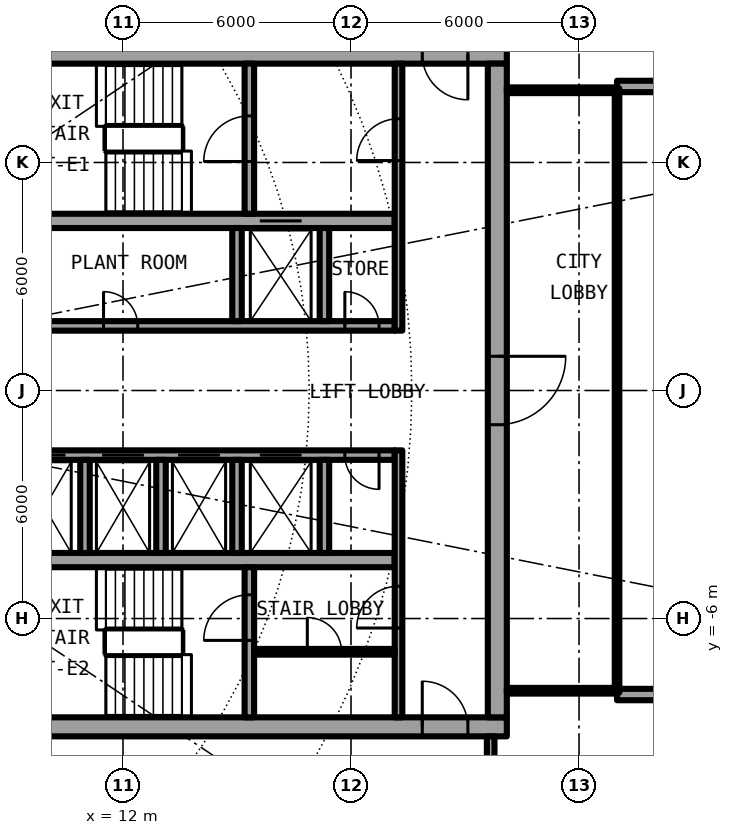
"""IFC4 building model, lengths in metres.
Left out: names, types, materials, properties, quantities, classifications, styles, units other than length and angle.
Written with IfcOpenShell. Run it as: python <this file> out.ifc"""

import sys

from ifc_helpers import new_model, si_unit, direction, frame, frame_2d, origin, place, context, subcontext, project, spatial, rectangle, extrude, element, fill, save


model = new_model("IFC4")
c1 = context("Model", 3, precision=1e-05, world=origin(), true_north=direction((0.0, 1.0)))
c2 = subcontext(c1, "Body", "Model", "MODEL_VIEW")
j1 = project(units=[si_unit("LENGTHUNIT", "METRE"), si_unit("PLANEANGLEUNIT", "RADIAN")], contexts=[c1])
p1 = place(None, origin())
s1 = spatial("IfcSite", under=j1, at=p1, CompositionType="ELEMENT")
p2 = place(p1, origin())
s2 = spatial("IfcBuilding", under=s1, at=p2, CompositionType="ELEMENT")
p3 = place(p2, frame((0.0, 0.0, 151.3)))
s3 = spatial("IfcBuildingStorey", under=s2, at=p3, CompositionType="ELEMENT", Elevation=151.3)
for number, where, z_axis, x_axis in (
    (1, (25.0, 8.0, 0.0), (0.0, 0.0, 1.0), (1.0, 0.0, 0.0)),
    (2, (25.0, -8.0, 0.0), (0.0, 0.0, 1.0), (1.0, 0.0, 0.0)),
):
    element("IfcWall", number, at=place(p3, frame(where, z_axis=z_axis, x_axis=x_axis)), inside=s3, PredefinedType="SOLIDWALL", context=c2, shape_type="SweptSolid", body=[
        extrude(rectangle(XDim=2.667, YDim=0.3, at=frame_2d((1.333, 0.0))), origin(), (0.0, 0.0, 1.0), 2.7),
    ])
p4 = place(p3, frame((22.1, 8.85, 0.0), z_axis=(0.0, 0.0, 1.0), x_axis=(-1.0, 0.0, 0.0)))
e3 = element("IfcWall", 3, at=p4, inside=s3, PredefinedType="SHEAR", context=c2, shape_type="SweptSolid", body=[
    extrude(rectangle(XDim=13.6, YDim=0.5, at=frame_2d((6.8, 0.0))), origin(), (0.0, 0.0, 1.0), 3.05),
])
p5 = place(p4, frame((1.025, 0.0, 0.0)))
e4 = element("IfcOpeningElement", 4, at=p5, cuts=e3, PredefinedType="OPENING", context=c2, shape_type="SweptSolid", body=[
    extrude(rectangle(XDim=1.2, YDim=2.3, at=frame_2d((0.6, 1.15))), frame((0.0, 0.26, 0.0), z_axis=(0.0, -1.0, 0.0), x_axis=(1.0, 0.0, 0.0)), (0.0, 0.0, 1.0), 0.52),
])
p6 = place(p3, frame((8.5, -8.85, 0.0), z_axis=(0.0, 0.0, 1.0), x_axis=(1.0, 0.0, 0.0)))
e5 = element("IfcWall", 5, at=p6, inside=s3, PredefinedType="SHEAR", context=c2, shape_type="SweptSolid", body=[
    extrude(rectangle(XDim=13.6, YDim=0.5, at=frame_2d((6.8, 0.0))), origin(), (0.0, 0.0, 1.0), 3.05),
])
p7 = place(p6, frame((11.375, 0.0, 0.0)))
e6 = element("IfcOpeningElement", 6, at=p7, cuts=e5, PredefinedType="OPENING", context=c2, shape_type="SweptSolid", body=[
    extrude(rectangle(XDim=1.2, YDim=2.3, at=frame_2d((0.6, 1.15))), frame((0.0, 0.26, 0.0), z_axis=(0.0, -1.0, 0.0), x_axis=(1.0, 0.0, 0.0)), (0.0, 0.0, 1.0), 0.52),
])
p8 = place(p3, frame((21.85, 8.6, 0.0), z_axis=(0.0, 0.0, 1.0), x_axis=(0.0, -1.0, 0.0)))
e7 = element("IfcWall", 7, at=p8, inside=s3, PredefinedType="SHEAR", context=c2, shape_type="SweptSolid", body=[
    extrude(rectangle(XDim=17.2, YDim=0.5, at=frame_2d((8.6, 0.0))), origin(), (0.0, 0.0, 1.0), 3.05),
])
p9 = place(p8, frame((7.7, 0.0, 0.0)))
e8 = element("IfcOpeningElement", 8, at=p9, cuts=e7, PredefinedType="OPENING", context=c2, shape_type="SweptSolid", body=[
    extrude(rectangle(XDim=1.8, YDim=2.3, at=frame_2d((0.9, 1.15))), frame((0.0, 0.26, 0.0), z_axis=(0.0, -1.0, 0.0), x_axis=(1.0, 0.0, 0.0)), (0.0, 0.0, 1.0), 0.52),
])
p10 = place(p3, frame((9.0, 1.7, 0.0), z_axis=(0.0, 0.0, 1.0), x_axis=(1.0, 0.0, 0.0)))
e9 = element("IfcWall", 9, at=p10, inside=s3, PredefinedType="SHEAR", context=c2, shape_type="SweptSolid", body=[
    extrude(rectangle(XDim=10.15, YDim=0.25, at=frame_2d((5.075, 0.0))), origin(), (0.0, 0.0, 1.0), 3.05),
])
p11 = place(p10, frame((2.488, 0.0, 0.0)))
e10 = element("IfcOpeningElement", 10, at=p11, cuts=e9, PredefinedType="OPENING", context=c2, shape_type="SweptSolid", body=[
    extrude(rectangle(XDim=0.9, YDim=2.3, at=frame_2d((0.45, 1.15))), frame((0.0, 0.135, 0.0), z_axis=(0.0, -1.0, 0.0), x_axis=(1.0, 0.0, 0.0)), (0.0, 0.0, 1.0), 0.27),
])
p12 = place(p10, frame((8.837, 0.0, 0.0)))
e11 = element("IfcOpeningElement", 11, at=p12, cuts=e9, PredefinedType="OPENING", context=c2, shape_type="SweptSolid", body=[
    extrude(rectangle(XDim=0.9, YDim=2.3, at=frame_2d((0.45, 1.15))), frame((0.0, 0.135, 0.0), z_axis=(0.0, -1.0, 0.0), x_axis=(1.0, 0.0, 0.0)), (0.0, 0.0, 1.0), 0.27),
])
p13 = place(p3, frame((9.0, 4.462, 0.0), z_axis=(0.0, 0.0, 1.0), x_axis=(1.0, 0.0, 0.0)))
e12 = element("IfcWall", 12, at=p13, inside=s3, PredefinedType="SHEAR", context=c2, shape_type="SweptSolid", body=[
    extrude(rectangle(XDim=10.15, YDim=0.375, at=frame_2d((5.075, 0.0))), origin(), (0.0, 0.0, 1.0), 3.05),
])
p14 = place(p13, frame((6.6, 0.0, 0.0)))
e13 = element("IfcOpeningElement", 13, at=p14, cuts=e12, PredefinedType="OPENING", context=c2, shape_type="SweptSolid", body=[
    extrude(rectangle(XDim=1.1, YDim=2.3, at=frame_2d((0.55, 1.15))), frame((0.0, 0.198, 0.0), z_axis=(0.0, -1.0, 0.0), x_axis=(1.0, 0.0, 0.0)), (0.0, 0.0, 1.0), 0.395),
])
p15 = place(p3, frame((15.325, 4.65, 0.0), z_axis=(0.0, 0.0, 1.0), x_axis=(0.0, 1.0, 0.0)))
e14 = element("IfcWall", 14, at=p15, inside=s3, PredefinedType="SHEAR", context=c2, shape_type="SweptSolid", body=[
    extrude(rectangle(XDim=3.95, YDim=0.25, at=frame_2d((1.975, 0.0))), origin(), (0.0, 0.0, 1.0), 3.05),
])
p16 = place(p15, frame((1.375, 0.0, 0.0)))
e15 = element("IfcOpeningElement", 15, at=p16, cuts=e14, PredefinedType="OPENING", context=c2, shape_type="SweptSolid", body=[
    extrude(rectangle(XDim=1.2, YDim=2.3, at=frame_2d((0.6, 1.15))), frame((0.0, 0.135, 0.0), z_axis=(0.0, -1.0, 0.0), x_axis=(1.0, 0.0, 0.0)), (0.0, 0.0, 1.0), 0.27),
])
for number, where, z_axis, x_axis in (
    (16, (15.0, 1.825, 0.0), (0.0, 0.0, 1.0), (0.0, 1.0, 0.0)),
    (17, (17.3, 1.825, 0.0), (0.0, 0.0, 1.0), (0.0, 1.0, 0.0)),
):
    element("IfcWall", number, at=place(p3, frame(where, z_axis=z_axis, x_axis=x_axis)), inside=s3, PredefinedType="SOLIDWALL", context=c2, shape_type="SweptSolid", body=[
        extrude(rectangle(XDim=2.45, YDim=0.25, at=frame_2d((1.225, 0.0))), origin(), (0.0, 0.0, 1.0), 2.7),
    ])
p17 = place(p3, frame((19.25, 1.575, 0.0), z_axis=(0.0, 0.0, 1.0), x_axis=(0.0, 1.0, 0.0)))
e18 = element("IfcWall", 18, at=p17, inside=s3, PredefinedType="SOLIDWALL", context=c2, shape_type="SweptSolid", body=[
    extrude(rectangle(XDim=7.025, YDim=0.2, at=frame_2d((3.513, 0.0))), origin(), (0.0, 0.0, 1.0), 2.7),
])
p18 = place(p17, frame((4.475, 0.0, 0.0)))
e19 = element("IfcOpeningElement", 19, at=p18, cuts=e18, PredefinedType="OPENING", context=c2, shape_type="SweptSolid", body=[
    extrude(rectangle(XDim=1.1, YDim=2.3, at=frame_2d((0.55, 1.15))), frame((0.0, 0.11, 0.0), z_axis=(0.0, -1.0, 0.0), x_axis=(1.0, 0.0, 0.0)), (0.0, 0.0, 1.0), 0.22),
])
p19 = place(p3, frame((19.15, -1.7, 0.0), z_axis=(0.0, 0.0, 1.0), x_axis=(-1.0, 0.0, 0.0)))
e20 = element("IfcWall", 20, at=p19, inside=s3, PredefinedType="SHEAR", context=c2, shape_type="SweptSolid", body=[
    extrude(rectangle(XDim=10.15, YDim=0.25, at=frame_2d((5.075, 0.0))), origin(), (0.0, 0.0, 1.0), 3.05),
])
p20 = place(p19, frame((8.663, 0.0, 0.0)))
e21 = element("IfcOpeningElement", 21, at=p20, cuts=e20, PredefinedType="OPENING", context=c2, shape_type="SweptSolid", body=[
    extrude(rectangle(XDim=1.1, YDim=2.3, at=frame_2d((0.55, 1.15))), frame((0.0, 0.135, 0.0), z_axis=(0.0, -1.0, 0.0), x_axis=(1.0, 0.0, 0.0)), (0.0, 0.0, 1.0), 0.27),
])
p21 = place(p19, frame((6.6, 0.0, 0.0)))
e22 = element("IfcOpeningElement", 22, at=p21, cuts=e20, PredefinedType="OPENING", context=c2, shape_type="SweptSolid", body=[
    extrude(rectangle(XDim=1.1, YDim=2.3, at=frame_2d((0.55, 1.15))), frame((0.0, 0.135, 0.0), z_axis=(0.0, -1.0, 0.0), x_axis=(1.0, 0.0, 0.0)), (0.0, 0.0, 1.0), 0.27),
])
p22 = place(p19, frame((4.6, 0.0, 0.0)))
e23 = element("IfcOpeningElement", 23, at=p22, cuts=e20, PredefinedType="OPENING", context=c2, shape_type="SweptSolid", body=[
    extrude(rectangle(XDim=1.1, YDim=2.3, at=frame_2d((0.55, 1.15))), frame((0.0, 0.135, 0.0), z_axis=(0.0, -1.0, 0.0), x_axis=(1.0, 0.0, 0.0)), (0.0, 0.0, 1.0), 0.27),
])
p23 = place(p19, frame((2.45, 0.0, 0.0)))
e24 = element("IfcOpeningElement", 24, at=p23, cuts=e20, PredefinedType="OPENING", context=c2, shape_type="SweptSolid", body=[
    extrude(rectangle(XDim=1.1, YDim=2.3, at=frame_2d((0.55, 1.15))), frame((0.0, 0.135, 0.0), z_axis=(0.0, -1.0, 0.0), x_axis=(1.0, 0.0, 0.0)), (0.0, 0.0, 1.0), 0.27),
])
p24 = place(p19, frame((0.413, 0.0, 0.0)))
e25 = element("IfcOpeningElement", 25, at=p24, cuts=e20, PredefinedType="OPENING", context=c2, shape_type="SweptSolid", body=[
    extrude(rectangle(XDim=0.9, YDim=2.3, at=frame_2d((0.45, 1.15))), frame((0.0, 0.135, 0.0), z_axis=(0.0, -1.0, 0.0), x_axis=(1.0, 0.0, 0.0)), (0.0, 0.0, 1.0), 0.27),
])
p25 = place(p3, frame((9.0, -4.462, 0.0), z_axis=(0.0, 0.0, 1.0), x_axis=(1.0, 0.0, 0.0)))
e26 = element("IfcWall", 26, at=p25, inside=s3, PredefinedType="SHEAR", context=c2, shape_type="SweptSolid", body=[
    extrude(rectangle(XDim=10.15, YDim=0.375, at=frame_2d((5.075, 0.0))), origin(), (0.0, 0.0, 1.0), 3.05),
])
p26 = place(p3, frame((15.325, -8.6, 0.0), z_axis=(0.0, 0.0, 1.0), x_axis=(0.0, 1.0, 0.0)))
e27 = element("IfcWall", 27, at=p26, inside=s3, PredefinedType="SHEAR", context=c2, shape_type="SweptSolid", body=[
    extrude(rectangle(XDim=3.95, YDim=0.25, at=frame_2d((1.975, 0.0))), origin(), (0.0, 0.0, 1.0), 3.05),
])
p27 = place(p26, frame((2.025, 0.0, 0.0)))
e28 = element("IfcOpeningElement", 28, at=p27, cuts=e27, PredefinedType="OPENING", context=c2, shape_type="SweptSolid", body=[
    extrude(rectangle(XDim=1.2, YDim=2.3, at=frame_2d((0.6, 1.15))), frame((0.0, 0.135, 0.0), z_axis=(0.0, -1.0, 0.0), x_axis=(1.0, 0.0, 0.0)), (0.0, 0.0, 1.0), 0.27),
])
for number, where, z_axis, x_axis in (
    (29, (15.0, -1.825, 0.0), (0.0, 0.0, 1.0), (0.0, -1.0, 0.0)),
    (30, (17.3, -1.825, 0.0), (0.0, 0.0, 1.0), (0.0, -1.0, 0.0)),
):
    element("IfcWall", number, at=place(p3, frame(where, z_axis=z_axis, x_axis=x_axis)), inside=s3, PredefinedType="SOLIDWALL", context=c2, shape_type="SweptSolid", body=[
        extrude(rectangle(XDim=2.45, YDim=0.25, at=frame_2d((1.225, 0.0))), origin(), (0.0, 0.0, 1.0), 2.7),
    ])
p28 = place(p3, frame((19.25, -8.6, 0.0), z_axis=(0.0, 0.0, 1.0), x_axis=(0.0, 1.0, 0.0)))
e31 = element("IfcWall", 31, at=p28, inside=s3, PredefinedType="SOLIDWALL", context=c2, shape_type="SweptSolid", body=[
    extrude(rectangle(XDim=7.025, YDim=0.2, at=frame_2d((3.513, 0.0))), origin(), (0.0, 0.0, 1.0), 2.7),
])
p29 = place(p28, frame((2.35, 0.0, 0.0)))
e32 = element("IfcOpeningElement", 32, at=p29, cuts=e31, PredefinedType="OPENING", context=c2, shape_type="SweptSolid", body=[
    extrude(rectangle(XDim=1.1, YDim=2.3, at=frame_2d((0.55, 1.15))), frame((0.0, 0.11, 0.0), z_axis=(0.0, -1.0, 0.0), x_axis=(1.0, 0.0, 0.0)), (0.0, 0.0, 1.0), 0.22),
])
for number, where, z_axis, x_axis in (
    (33, (11.0, -1.825, 0.0), (0.0, 0.0, 1.0), (0.0, -1.0, 0.0)),
    (34, (13.0, -1.825, 0.0), (0.0, 0.0, 1.0), (0.0, -1.0, 0.0)),
):
    element("IfcWall", number, at=place(p3, frame(where, z_axis=z_axis, x_axis=x_axis)), inside=s3, PredefinedType="SOLIDWALL", context=c2, shape_type="SweptSolid", body=[
        extrude(rectangle(XDim=2.45, YDim=0.25, at=frame_2d((1.225, 0.0))), origin(), (0.0, 0.0, 1.0), 2.7),
    ])
p30 = place(p3, frame((15.45, -6.875, 0.0), z_axis=(0.0, 0.0, 1.0), x_axis=(1.0, 0.0, 0.0)))
e35 = element("IfcWall", 35, at=p30, inside=s3, PredefinedType="PARTITIONING", context=c2, shape_type="SweptSolid", body=[
    extrude(rectangle(XDim=3.7, YDim=0.15, at=frame_2d((1.85, 0.0))), origin(), (0.0, 0.0, 1.0), 2.7),
])
p31 = place(p30, frame((1.4, 0.0, 0.0)))
e36 = element("IfcOpeningElement", 36, at=p31, cuts=e35, PredefinedType="OPENING", context=c2, shape_type="SweptSolid", body=[
    extrude(rectangle(XDim=0.9, YDim=2.3, at=frame_2d((0.45, 1.15))), frame((0.0, 0.085, 0.0), z_axis=(0.0, -1.0, 0.0), x_axis=(1.0, 0.0, 0.0)), (0.0, 0.0, 1.0), 0.17),
])
for number, where, z_axis, x_axis in (
    (37, (22.1, -7.9, 0.0), (0.0, 0.0, 1.0), (1.0, 0.0, 0.0)),
    (38, (22.1, 7.9, 0.0), (0.0, 0.0, 1.0), (1.0, 0.0, 0.0)),
):
    element("IfcWall", number, at=place(p3, frame(where, z_axis=z_axis, x_axis=x_axis)), inside=s3, PredefinedType="PARTITIONING", context=c2, shape_type="SweptSolid", body=[
        extrude(rectangle(XDim=2.84, YDim=0.15, at=frame_2d((1.42, 0.0))), origin(), (0.0, 0.0, 1.0), 2.7),
    ])
p32 = place(p3, frame((25.0, -7.95, 0.0), z_axis=(0.0, 0.0, 1.0), x_axis=(0.0, 1.0, 0.0)))
e39 = element("IfcWall", 39, at=p32, inside=s3, PredefinedType="PARTITIONING", context=c2, shape_type="SweptSolid", body=[
    extrude(rectangle(XDim=15.9, YDim=0.12, at=frame_2d((7.95, 0.0))), origin(), (0.0, 0.0, 1.0), 2.7),
])
p33 = place(p32, frame((0.95, 0.0, 0.1)))
e40 = element("IfcOpeningElement", 40, at=p33, cuts=e39, PredefinedType="OPENING", context=c2, shape_type="SweptSolid", body=[
    extrude(rectangle(XDim=14.0, YDim=2.35, at=frame_2d((7.0, 1.175))), frame((0.0, 0.07, 0.0), z_axis=(0.0, -1.0, 0.0), x_axis=(1.0, 0.0, 0.0)), (0.0, 0.0, 1.0), 0.14),
])
p34 = place(p3, frame((21.675, -10.85, 0.0), z_axis=(0.0, 0.0, 1.0), x_axis=(0.0, 1.0, 0.0)))
e41 = element("IfcWall", 41, at=p34, inside=s3, PredefinedType="PARTITIONING", context=c2, shape_type="SweptSolid", body=[
    extrude(rectangle(XDim=1.75, YDim=0.2, at=frame_2d((0.875, 0.0))), origin(), (0.0, 0.0, 1.0), 2.7),
])
p35 = place(p3, frame((4.908, -5.959, 0.0), z_axis=(0.0, 0.0, 1.0), x_axis=(0.636115614725, -0.771593756262, 0.0)))
e42 = element("IfcWall", 42, at=p35, inside=s3, PredefinedType="PARTITIONING", context=c2, shape_type="SweptSolid", body=[
    extrude(rectangle(XDim=8.967, YDim=0.1, at=frame_2d((4.483, 0.0))), origin(), (0.0, 0.0, 1.0), 2.7),
])
p36 = place(p35, frame((6.4, 0.0, 0.0)))
e43 = element("IfcOpeningElement", 43, at=p36, cuts=e42, PredefinedType="OPENING", context=c2, shape_type="SweptSolid", body=[
    extrude(rectangle(XDim=0.9, YDim=2.3, at=frame_2d((0.45, 1.15))), frame((0.0, 0.06, 0.0), z_axis=(0.0, -1.0, 0.0), x_axis=(1.0, 0.0, 0.0)), (0.0, 0.0, 1.0), 0.12),
])
p37 = place(p35, frame((1.917, 0.0, 0.0)))
e44 = element("IfcOpeningElement", 44, at=p37, cuts=e42, PredefinedType="OPENING", context=c2, shape_type="SweptSolid", body=[
    extrude(rectangle(XDim=0.9, YDim=2.3, at=frame_2d((0.45, 1.15))), frame((0.0, 0.06, 0.0), z_axis=(0.0, -1.0, 0.0), x_axis=(1.0, 0.0, 0.0)), (0.0, 0.0, 1.0), 0.12),
])
p38 = place(p3, frame((4.909, 5.958, 0.0), z_axis=(0.0, 0.0, 1.0), x_axis=(0.635879010442, 0.771788756124, 0.0)))
e45 = element("IfcWall", 45, at=p38, inside=s3, PredefinedType="PARTITIONING", context=c2, shape_type="SweptSolid", body=[
    extrude(rectangle(XDim=8.967, YDim=0.1, at=frame_2d((4.484, 0.0))), origin(), (0.0, 0.0, 1.0), 2.7),
])
p39 = place(p38, frame((6.4, 0.0, 0.0)))
e46 = element("IfcOpeningElement", 46, at=p39, cuts=e45, PredefinedType="OPENING", context=c2, shape_type="SweptSolid", body=[
    extrude(rectangle(XDim=0.9, YDim=2.3, at=frame_2d((0.45, 1.15))), frame((0.0, 0.06, 0.0), z_axis=(0.0, -1.0, 0.0), x_axis=(1.0, 0.0, 0.0)), (0.0, 0.0, 1.0), 0.12),
])
p40 = place(p38, frame((1.917, 0.0, 0.0)))
e47 = element("IfcOpeningElement", 47, at=p40, cuts=e45, PredefinedType="OPENING", context=c2, shape_type="SweptSolid", body=[
    extrude(rectangle(XDim=0.9, YDim=2.3, at=frame_2d((0.45, 1.15))), frame((0.0, 0.06, 0.0), z_axis=(0.0, -1.0, 0.0), x_axis=(1.0, 0.0, 0.0)), (0.0, 0.0, 1.0), 0.12),
])
p41 = place(p14, origin())
e48 = element("IfcDoor", 48, at=p41, inside=s3, OperationType="DOUBLE_DOOR_SLIDING", PredefinedType="DOOR", context=c2, shape_type="SweptSolid", body=[
    extrude(rectangle(XDim=1.1, YDim=2.3, at=frame_2d((0.55, 1.15))), frame((0.0, 0.025, 0.0), z_axis=(0.0, -1.0, 0.0), x_axis=(1.0, 0.0, 0.0)), (0.0, 0.0, 1.0), 0.05),
])
fill(e13, e48)
p42 = place(p20, origin())
e49 = element("IfcDoor", 49, at=p42, inside=s3, OperationType="DOUBLE_DOOR_SLIDING", PredefinedType="DOOR", context=c2, shape_type="SweptSolid", body=[
    extrude(rectangle(XDim=1.1, YDim=2.3, at=frame_2d((0.55, 1.15))), frame((0.0, 0.025, 0.0), z_axis=(0.0, -1.0, 0.0), x_axis=(1.0, 0.0, 0.0)), (0.0, 0.0, 1.0), 0.05),
])
fill(e21, e49)
p43 = place(p21, origin())
e50 = element("IfcDoor", 50, at=p43, inside=s3, OperationType="DOUBLE_DOOR_SLIDING", PredefinedType="DOOR", context=c2, shape_type="SweptSolid", body=[
    extrude(rectangle(XDim=1.1, YDim=2.3, at=frame_2d((0.55, 1.15))), frame((0.0, 0.025, 0.0), z_axis=(0.0, -1.0, 0.0), x_axis=(1.0, 0.0, 0.0)), (0.0, 0.0, 1.0), 0.05),
])
fill(e22, e50)
p44 = place(p22, origin())
e51 = element("IfcDoor", 51, at=p44, inside=s3, OperationType="DOUBLE_DOOR_SLIDING", PredefinedType="DOOR", context=c2, shape_type="SweptSolid", body=[
    extrude(rectangle(XDim=1.1, YDim=2.3, at=frame_2d((0.55, 1.15))), frame((0.0, 0.025, 0.0), z_axis=(0.0, -1.0, 0.0), x_axis=(1.0, 0.0, 0.0)), (0.0, 0.0, 1.0), 0.05),
])
fill(e23, e51)
p45 = place(p23, origin())
e52 = element("IfcDoor", 52, at=p45, inside=s3, OperationType="DOUBLE_DOOR_SLIDING", PredefinedType="DOOR", context=c2, shape_type="SweptSolid", body=[
    extrude(rectangle(XDim=1.1, YDim=2.3, at=frame_2d((0.55, 1.15))), frame((0.0, 0.025, 0.0), z_axis=(0.0, -1.0, 0.0), x_axis=(1.0, 0.0, 0.0)), (0.0, 0.0, 1.0), 0.05),
])
fill(e24, e52)
p46 = place(p11, origin())
e53 = element("IfcDoor", 53, at=p46, inside=s3, OperationType="SINGLE_SWING_RIGHT", PredefinedType="DOOR", context=c2, shape_type="SweptSolid", body=[
    extrude(rectangle(XDim=0.9, YDim=2.3, at=frame_2d((0.45, 1.15))), frame((0.0, 0.025, 0.0), z_axis=(0.0, -1.0, 0.0), x_axis=(1.0, 0.0, 0.0)), (0.0, 0.0, 1.0), 0.05),
])
fill(e10, e53)
p47 = place(p12, origin())
e54 = element("IfcDoor", 54, at=p47, inside=s3, OperationType="SINGLE_SWING_LEFT", PredefinedType="DOOR", context=c2, shape_type="SweptSolid", body=[
    extrude(rectangle(XDim=0.9, YDim=2.3, at=frame_2d((0.45, 1.15))), frame((0.0, 0.025, 0.0), z_axis=(0.0, -1.0, 0.0), x_axis=(1.0, 0.0, 0.0)), (0.0, 0.0, 1.0), 0.05),
])
fill(e11, e54)
p48 = place(p24, origin())
e55 = element("IfcDoor", 55, at=p48, inside=s3, OperationType="SINGLE_SWING_RIGHT", PredefinedType="DOOR", context=c2, shape_type="SweptSolid", body=[
    extrude(rectangle(XDim=0.9, YDim=2.3, at=frame_2d((0.45, 1.15))), frame((0.0, 0.025, 0.0), z_axis=(0.0, -1.0, 0.0), x_axis=(1.0, 0.0, 0.0)), (0.0, 0.0, 1.0), 0.05),
])
fill(e25, e55)
p49 = place(p31, origin())
e56 = element("IfcDoor", 56, at=p49, inside=s3, OperationType="SINGLE_SWING_LEFT", PredefinedType="DOOR", context=c2, shape_type="SweptSolid", body=[
    extrude(rectangle(XDim=0.9, YDim=2.3, at=frame_2d((0.45, 1.15))), frame((0.0, 0.025, 0.0), z_axis=(0.0, -1.0, 0.0), x_axis=(1.0, 0.0, 0.0)), (0.0, 0.0, 1.0), 0.05),
])
fill(e36, e56)
p50 = place(p16, origin())
e57 = element("IfcDoor", 57, at=p50, inside=s3, OperationType="SINGLE_SWING_LEFT", PredefinedType="DOOR", context=c2, shape_type="SweptSolid", body=[
    extrude(rectangle(XDim=1.2, YDim=2.3, at=frame_2d((0.6, 1.15))), frame((0.0, 0.025, 0.0), z_axis=(0.0, -1.0, 0.0), x_axis=(1.0, 0.0, 0.0)), (0.0, 0.0, 1.0), 0.05),
])
fill(e15, e57)
p51 = place(p27, origin())
e58 = element("IfcDoor", 58, at=p51, inside=s3, OperationType="SINGLE_SWING_LEFT", PredefinedType="DOOR", context=c2, shape_type="SweptSolid", body=[
    extrude(rectangle(XDim=1.2, YDim=2.3, at=frame_2d((0.6, 1.15))), frame((0.0, 0.025, 0.0), z_axis=(0.0, -1.0, 0.0), x_axis=(1.0, 0.0, 0.0)), (0.0, 0.0, 1.0), 0.05),
])
fill(e28, e58)
p52 = place(p18, origin())
e59 = element("IfcDoor", 59, at=p52, inside=s3, OperationType="SINGLE_SWING_LEFT", PredefinedType="DOOR", context=c2, shape_type="SweptSolid", body=[
    extrude(rectangle(XDim=1.1, YDim=2.3, at=frame_2d((0.55, 1.15))), frame((0.0, 0.025, 0.0), z_axis=(0.0, -1.0, 0.0), x_axis=(1.0, 0.0, 0.0)), (0.0, 0.0, 1.0), 0.05),
])
fill(e19, e59)
p53 = place(p29, origin())
e60 = element("IfcDoor", 60, at=p53, inside=s3, OperationType="SINGLE_SWING_RIGHT", PredefinedType="DOOR", context=c2, shape_type="SweptSolid", body=[
    extrude(rectangle(XDim=1.1, YDim=2.3, at=frame_2d((0.55, 1.15))), frame((0.0, 0.025, 0.0), z_axis=(0.0, -1.0, 0.0), x_axis=(1.0, 0.0, 0.0)), (0.0, 0.0, 1.0), 0.05),
])
fill(e32, e60)
p54 = place(p5, origin())
e61 = element("IfcDoor", 61, at=p54, inside=s3, OperationType="SINGLE_SWING_RIGHT", PredefinedType="DOOR", context=c2, shape_type="SweptSolid", body=[
    extrude(rectangle(XDim=1.2, YDim=2.3, at=frame_2d((0.6, 1.15))), frame((0.0, 0.025, 0.0), z_axis=(0.0, -1.0, 0.0), x_axis=(1.0, 0.0, 0.0)), (0.0, 0.0, 1.0), 0.05),
])
fill(e4, e61)
p55 = place(p7, origin())
e62 = element("IfcDoor", 62, at=p55, inside=s3, OperationType="SINGLE_SWING_LEFT", PredefinedType="DOOR", context=c2, shape_type="SweptSolid", body=[
    extrude(rectangle(XDim=1.2, YDim=2.3, at=frame_2d((0.6, 1.15))), frame((0.0, 0.025, 0.0), z_axis=(0.0, -1.0, 0.0), x_axis=(1.0, 0.0, 0.0)), (0.0, 0.0, 1.0), 0.05),
])
fill(e6, e62)
p56 = place(p9, origin())
e63 = element("IfcDoor", 63, at=p56, inside=s3, OperationType="SINGLE_SWING_LEFT", PredefinedType="DOOR", context=c2, shape_type="SweptSolid", body=[
    extrude(rectangle(XDim=1.8, YDim=2.3, at=frame_2d((0.9, 1.15))), frame((0.0, 0.025, 0.0), z_axis=(0.0, -1.0, 0.0), x_axis=(1.0, 0.0, 0.0)), (0.0, 0.0, 1.0), 0.05),
])
fill(e8, e63)
p57 = place(p33, origin())
e64 = element("IfcWindow", 64, at=p57, inside=s3, PartitioningType="SINGLE_PANEL", PredefinedType="WINDOW", context=c2, shape_type="SweptSolid", body=[
    extrude(rectangle(XDim=14.0, YDim=2.35, at=frame_2d((7.0, 1.175))), frame((0.0, 0.03, 0.0), z_axis=(0.0, -1.0, 0.0), x_axis=(1.0, 0.0, 0.0)), (0.0, 0.0, 1.0), 0.06),
])
fill(e40, e64)
save(model, sys.argv[1])
